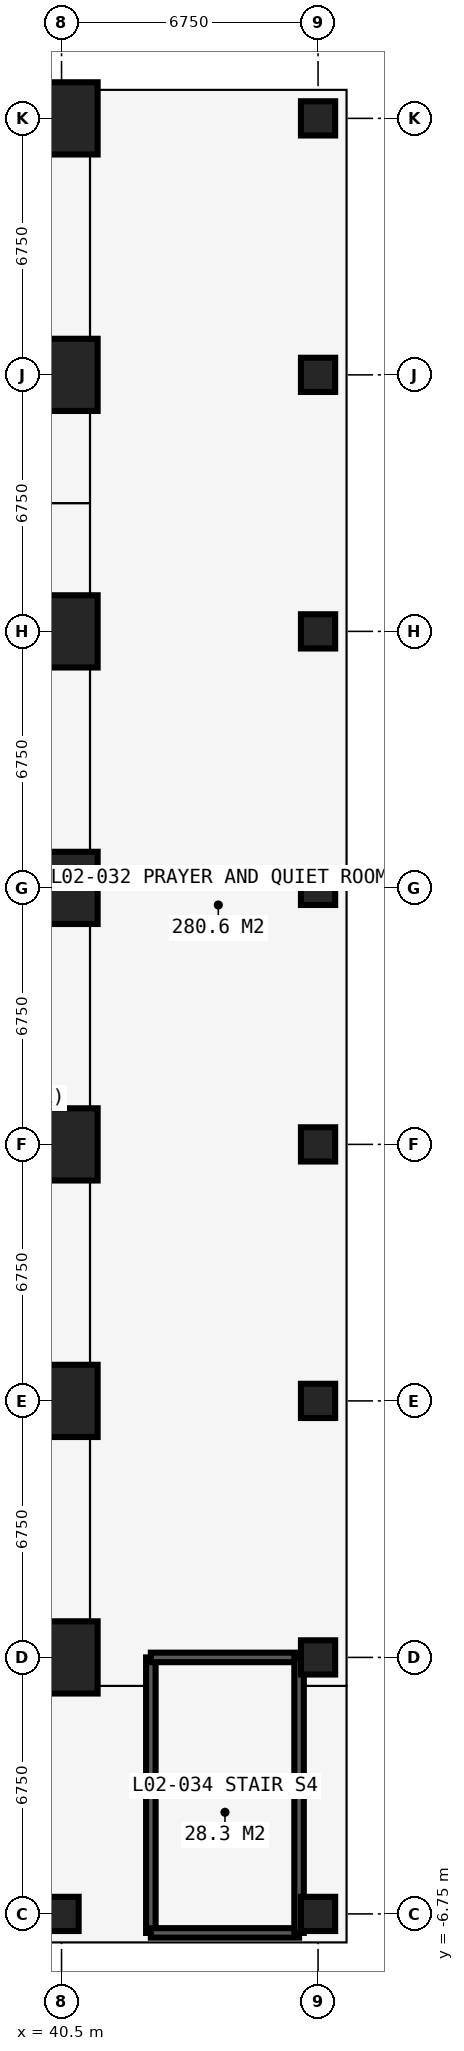
"""IFC4 building model, lengths in metres.
Left out: names, types, materials, properties, quantities, classifications, styles, units other than length and angle.
Written with IfcOpenShell. Run it as: python <this file> out.ifc"""

import sys

from ifc_helpers import new_model, si_unit, direction, frame, frame_2d, origin, origin_2d, place, context, subcontext, project, spatial, rectangle, circle, extrude, element, fill, save


model = new_model("IFC4")
c1 = context("Model", 3, precision=1e-05, world=origin(), true_north=direction((0.0, 1.0)))
c2 = subcontext(c1, "Body", "Model", "MODEL_VIEW")
j1 = project(units=[si_unit("LENGTHUNIT", "METRE"), si_unit("PLANEANGLEUNIT", "RADIAN")], contexts=[c1])
p1 = place(None, origin())
s1 = spatial("IfcSite", under=j1, at=p1, CompositionType="ELEMENT")
p2 = place(p1, origin())
s2 = spatial("IfcBuilding", under=s1, at=p2, CompositionType="ELEMENT")
p3 = place(p2, frame((0.0, 0.0, 9.0)))
s3 = spatial("IfcBuildingStorey", under=s2, at=p3, CompositionType="ELEMENT", Elevation=9.0)
p4 = place(p3, frame((40.5, -6.75, 0.0), z_axis=(0.0, 0.0, 1.0), x_axis=(1.0, 0.0, 0.0)))
e1 = element("IfcColumn", 1, at=p4, inside=s3, PredefinedType="COLUMN", context=c2, shape_type="SweptSolid", body=[
    extrude(circle(Radius=0.45, at=origin_2d()), origin(), (0.0, 0.0, 1.0), 4.5),
])
for number, where, z_axis, x_axis in (
    (2, (40.5, 0.0, 0.0), (0.0, 0.0, 1.0), (1.0, 0.0, 0.0)),
    (3, (40.5, 6.75, 0.0), (0.0, 0.0, 1.0), (1.0, 0.0, 0.0)),
    (4, (40.5, 13.5, 0.0), (0.0, 0.0, 1.0), (1.0, 0.0, 0.0)),
    (5, (40.5, 20.25, 0.0), (0.0, 0.0, 1.0), (1.0, 0.0, 0.0)),
    (6, (40.5, 27.0, 0.0), (0.0, 0.0, 1.0), (1.0, 0.0, 0.0)),
    (7, (40.5, 33.75, 0.0), (0.0, 0.0, 1.0), (1.0, 0.0, 0.0)),
    (8, (40.5, 40.5, 0.0), (0.0, 0.0, 1.0), (1.0, 0.0, 0.0)),
):
    element("IfcColumn", number, at=place(p3, frame(where, z_axis=z_axis, x_axis=x_axis)), inside=s3, PredefinedType="COLUMN", context=c2, shape_type="SweptSolid", body=[
        extrude(rectangle(XDim=1.9, YDim=1.9, at=origin_2d()), origin(), (0.0, 0.0, 1.0), 4.5),
    ])
for number, where, z_axis, x_axis in (
    (9, (47.25, -6.75, 0.0), (0.0, 0.0, 1.0), (1.0, 0.0, 0.0)),
    (10, (47.25, 0.0, 0.0), (0.0, 0.0, 1.0), (1.0, 0.0, 0.0)),
    (11, (47.25, 6.75, 0.0), (0.0, 0.0, 1.0), (1.0, 0.0, 0.0)),
    (12, (47.25, 13.5, 0.0), (0.0, 0.0, 1.0), (1.0, 0.0, 0.0)),
    (13, (47.25, 20.25, 0.0), (0.0, 0.0, 1.0), (1.0, 0.0, 0.0)),
    (14, (47.25, 27.0, 0.0), (0.0, 0.0, 1.0), (1.0, 0.0, 0.0)),
    (15, (47.25, 33.75, 0.0), (0.0, 0.0, 1.0), (1.0, 0.0, 0.0)),
    (16, (47.25, 40.5, 0.0), (0.0, 0.0, 1.0), (1.0, 0.0, 0.0)),
):
    element("IfcColumn", number, at=place(p3, frame(where, z_axis=z_axis, x_axis=x_axis)), inside=s3, PredefinedType="COLUMN", context=c2, shape_type="SweptSolid", body=[
        extrude(circle(Radius=0.45, at=origin_2d()), origin(), (0.0, 0.0, 1.0), 4.5),
    ])
p5 = place(p3, frame((40.5, -7.5, 0.0), z_axis=(0.0, 0.0, 1.0), x_axis=(-1.0, 0.0, 0.0)))
e17 = element("IfcWall", 17, at=p5, inside=s3, PredefinedType="SOLIDWALL", context=c2, shape_type="SweptSolid", body=[
    extrude(rectangle(XDim=6.75, YDim=0.15, at=frame_2d((3.375, 0.0))), origin(), (0.0, 0.0, 1.0), 4.25),
])
p6 = place(p5, frame((0.488, 0.0, 0.0)))
e18 = element("IfcOpeningElement", 18, at=p6, cuts=e17, PredefinedType="OPENING", context=c2, shape_type="SweptSolid", body=[
    extrude(rectangle(XDim=2.4, YDim=2.4, at=frame_2d((1.2, 1.2))), frame((0.0, 0.085, 0.0), z_axis=(0.0, -1.0, 0.0), x_axis=(1.0, 0.0, 0.0)), (0.0, 0.0, 1.0), 0.17),
])
p7 = place(p5, frame((3.863, 0.0, 0.0)))
e19 = element("IfcOpeningElement", 19, at=p7, cuts=e17, PredefinedType="OPENING", context=c2, shape_type="SweptSolid", body=[
    extrude(rectangle(XDim=2.4, YDim=2.4, at=frame_2d((1.2, 1.2))), frame((0.0, 0.085, 0.0), z_axis=(0.0, -1.0, 0.0), x_axis=(1.0, 0.0, 0.0)), (0.0, 0.0, 1.0), 0.17),
])
p8 = place(p3, frame((-7.484, -0.75, 0.0), z_axis=(0.0, 0.0, 1.0), x_axis=(1.0, 0.0, 0.0)))
e20 = element("IfcWall", 20, at=p8, inside=s3, PredefinedType="PARTITIONING", context=c2, shape_type="SweptSolid", body=[
    extrude(rectangle(XDim=50.334, YDim=0.15, at=frame_2d((25.167, 0.0))), origin(), (0.0, 0.0, 1.0), 4.25),
])
p9 = place(p8, frame((21.934, 0.0, 0.0)))
e21 = element("IfcOpeningElement", 21, at=p9, cuts=e20, PredefinedType="OPENING", context=c2, shape_type="SweptSolid", body=[
    extrude(rectangle(XDim=1.6, YDim=2.4, at=frame_2d((0.8, 1.2))), frame((0.0, 0.085, 0.0), z_axis=(0.0, -1.0, 0.0), x_axis=(1.0, 0.0, 0.0)), (0.0, 0.0, 1.0), 0.17),
])
p10 = place(p3, frame((30.375, 30.375, 0.0), z_axis=(0.0, 0.0, 1.0), x_axis=(1.0, 0.0, 0.0)))
e22 = element("IfcWall", 22, at=p10, inside=s3, PredefinedType="PARTITIONING", context=c2, shape_type="SweptSolid", body=[
    extrude(rectangle(XDim=10.875, YDim=0.15, at=frame_2d((5.438, 0.0))), origin(), (0.0, 0.0, 1.0), 4.25),
])
p11 = place(p3, frame((41.25, -0.75, 0.0), z_axis=(0.0, 0.0, 1.0), x_axis=(0.0, 1.0, 0.0)))
e23 = element("IfcWall", 23, at=p11, inside=s3, PredefinedType="PARTITIONING", context=c2, shape_type="SweptSolid", body=[
    extrude(rectangle(XDim=41.984, YDim=0.15, at=frame_2d((20.992, 0.0))), origin(), (0.0, 0.0, 1.0), 4.25),
])
p12 = place(p11, frame((15.2, 0.0, 0.0)))
e24 = element("IfcOpeningElement", 24, at=p12, cuts=e23, PredefinedType="OPENING", context=c2, shape_type="SweptSolid", body=[
    extrude(rectangle(XDim=1.6, YDim=2.4, at=frame_2d((0.8, 1.2))), frame((0.0, 0.085, 0.0), z_axis=(0.0, -1.0, 0.0), x_axis=(1.0, 0.0, 0.0)), (0.0, 0.0, 1.0), 0.17),
])
p13 = place(p3, frame((42.85, -7.25, 0.0), z_axis=(0.0, 0.0, 1.0), x_axis=(0.0, 1.0, 0.0)))
e25 = element("IfcWall", 25, at=p13, inside=s3, PredefinedType="SOLIDWALL", context=c2, shape_type="SweptSolid", body=[
    extrude(rectangle(XDim=7.25, YDim=0.25, at=frame_2d((3.625, 0.0))), origin(), (0.0, 0.0, 1.0), 4.25),
])
p14 = place(p3, frame((42.85, -7.25, 0.0), z_axis=(0.0, 0.0, 1.0), x_axis=(1.0, 0.0, 0.0)))
e26 = element("IfcWall", 26, at=p14, inside=s3, PredefinedType="SOLIDWALL", context=c2, shape_type="SweptSolid", body=[
    extrude(rectangle(XDim=3.9, YDim=0.25, at=frame_2d((1.95, 0.0))), origin(), (0.0, 0.0, 1.0), 4.25),
])
p15 = place(p14, frame((1.35, 0.0, 0.0)))
e27 = element("IfcOpeningElement", 27, at=p15, cuts=e26, PredefinedType="OPENING", context=c2, shape_type="SweptSolid", body=[
    extrude(rectangle(XDim=1.2, YDim=2.2, at=frame_2d((0.6, 1.1))), frame((0.0, 0.135, 0.0), z_axis=(0.0, -1.0, 0.0), x_axis=(1.0, 0.0, 0.0)), (0.0, 0.0, 1.0), 0.27),
])
p16 = place(p3, frame((42.85, 0.0, 0.0), z_axis=(0.0, 0.0, 1.0), x_axis=(1.0, 0.0, 0.0)))
e28 = element("IfcWall", 28, at=p16, inside=s3, PredefinedType="SOLIDWALL", context=c2, shape_type="SweptSolid", body=[
    extrude(rectangle(XDim=3.9, YDim=0.25, at=frame_2d((1.95, 0.0))), origin(), (0.0, 0.0, 1.0), 4.25),
])
p17 = place(p3, frame((46.75, -7.25, 0.0), z_axis=(0.0, 0.0, 1.0), x_axis=(0.0, 1.0, 0.0)))
e29 = element("IfcWall", 29, at=p17, inside=s3, PredefinedType="SOLIDWALL", context=c2, shape_type="SweptSolid", body=[
    extrude(rectangle(XDim=7.25, YDim=0.25, at=frame_2d((3.625, 0.0))), origin(), (0.0, 0.0, 1.0), 4.25),
])
p18 = place(p3, frame((46.75, -0.75, 0.0), z_axis=(0.0, 0.0, 1.0), x_axis=(1.0, 0.0, 0.0)))
e30 = element("IfcWall", 30, at=p18, inside=s3, PredefinedType="PARTITIONING", context=c2, shape_type="SweptSolid", body=[
    extrude(rectangle(XDim=1.234, YDim=0.15, at=frame_2d((0.617, 0.0))), origin(), (0.0, 0.0, 1.0), 4.25),
])
p19 = place(p12, origin())
e31 = element("IfcDoor", 31, at=p19, inside=s3, OperationType="DOUBLE_DOOR_SINGLE_SWING", PredefinedType="DOOR", context=c2, shape_type="SweptSolid", body=[
    extrude(rectangle(XDim=1.6, YDim=2.4, at=frame_2d((0.8, 1.2))), frame((0.0, 0.025, 0.0), z_axis=(0.0, -1.0, 0.0), x_axis=(1.0, 0.0, 0.0)), (0.0, 0.0, 1.0), 0.05),
])
fill(e24, e31)
p20 = place(p15, origin())
e32 = element("IfcDoor", 32, at=p20, inside=s3, OperationType="SINGLE_SWING_LEFT", PredefinedType="DOOR", context=c2, shape_type="SweptSolid", body=[
    extrude(rectangle(XDim=1.2, YDim=2.2, at=frame_2d((0.6, 1.1))), frame((0.0, 0.025, 0.0), z_axis=(0.0, -1.0, 0.0), x_axis=(1.0, 0.0, 0.0)), (0.0, 0.0, 1.0), 0.05),
])
fill(e27, e32)
save(model, sys.argv[1])
